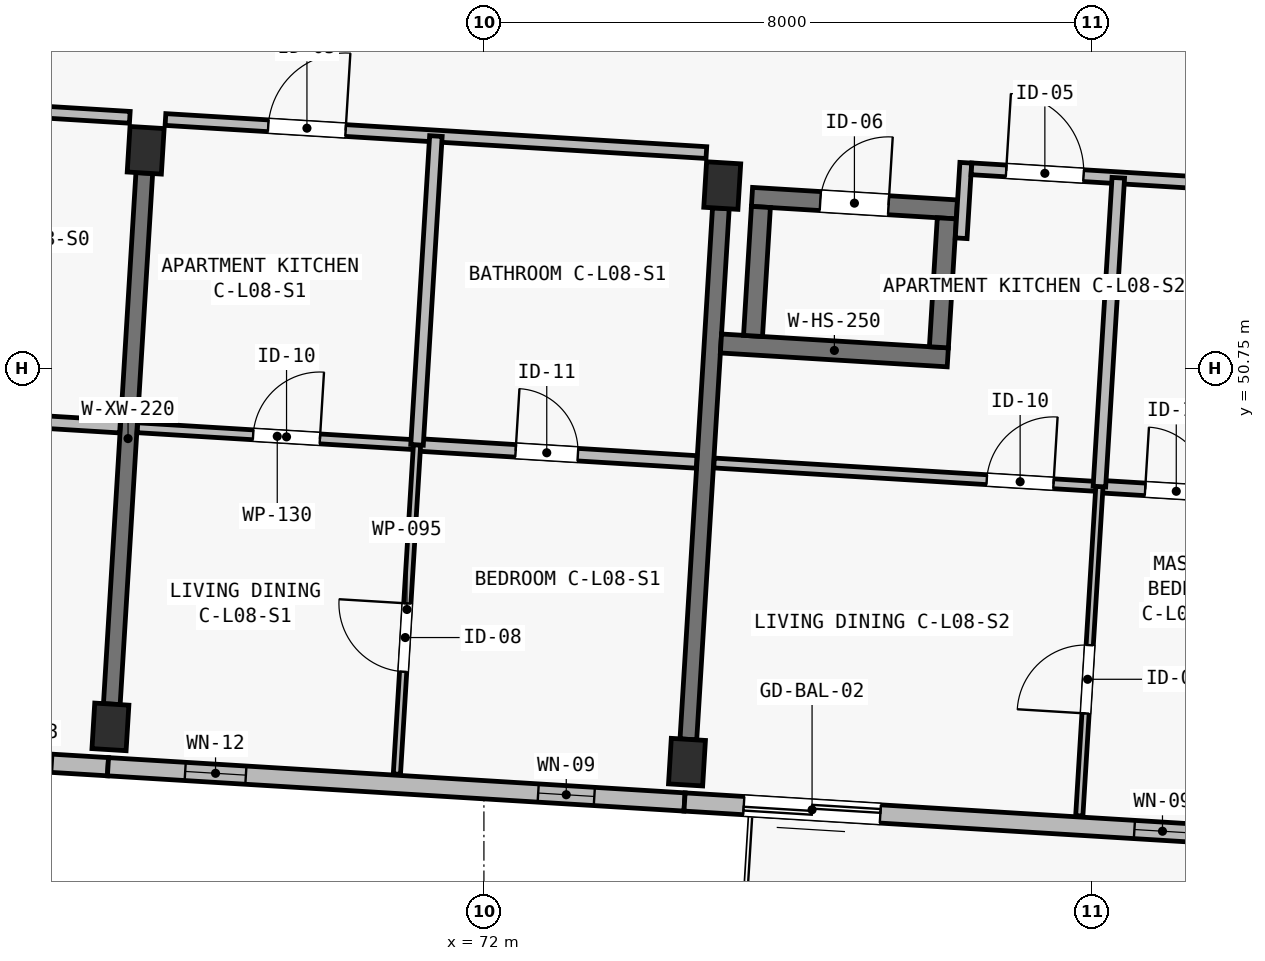
"""IFC4 building model, lengths in metres.
Left out: names, types, materials, properties, quantities, classifications, styles, units other than length and angle.
Written with IfcOpenShell. Run it as: python <this file> out.ifc"""

import sys

from ifc_helpers import new_model, si_unit, direction, frame, frame_2d, origin, origin_2d, place, context, subcontext, project, spatial, rectangle, extrude, element, fill, save


model = new_model("IFC4")
c1 = context("Model", 3, precision=1e-05, world=origin(), true_north=direction((0.0, 1.0)))
c2 = subcontext(c1, "Body", "Model", "MODEL_VIEW")
j1 = project(units=[si_unit("LENGTHUNIT", "METRE"), si_unit("PLANEANGLEUNIT", "RADIAN")], contexts=[c1])
p1 = place(None, origin())
s1 = spatial("IfcSite", under=j1, at=p1, CompositionType="ELEMENT")
p2 = place(p1, origin())
s2 = spatial("IfcBuilding", under=s1, at=p2, CompositionType="ELEMENT")
p3 = place(p2, frame((0.0, 0.0, 27.9)))
s3 = spatial("IfcBuildingStorey", under=s2, at=p3, CompositionType="ELEMENT", Elevation=27.9)
for number, where, z_axis, x_axis in (
    (1, (67.086, 46.036, 0.0), (0.0, 0.0, 1.0), (0.998, -0.061, 0.0)),
    (2, (67.55, 53.622, 0.0), (0.0, 0.0, 1.0), (0.998, -0.061, 0.0)),
    (3, (74.672, 45.572, 0.0), (0.0, 0.0, 1.0), (0.998, -0.061, 0.0)),
    (4, (75.135, 53.158, 0.0), (0.0, 0.0, 1.0), (0.998, -0.061, 0.0)),
):
    element("IfcColumn", number, at=place(p3, frame(where, z_axis=z_axis, x_axis=x_axis)), inside=s3, PredefinedType="COLUMN", context=c2, shape_type="SweptSolid", body=[
        extrude(rectangle(XDim=0.45, YDim=0.6, at=origin_2d()), origin(), (0.0, 0.0, 1.0), 3.25),
    ])
p4 = place(p3, frame((67.104, 46.335, 0.0), z_axis=(0.0, 0.0, 1.0), x_axis=(0.061034188237, 0.998135676081, 0.0)))
e5 = element("IfcWall", 5, at=p4, inside=s3, PredefinedType="SHEAR", context=c2, shape_type="SweptSolid", body=[
    extrude(rectangle(XDim=7.0, YDim=0.22, at=frame_2d((3.5, 0.0))), origin(), (0.0, 0.0, 1.0), 2.5),
])
p5 = place(p3, frame((74.69, 45.872, 0.0), z_axis=(0.0, 0.0, 1.0), x_axis=(0.061036313012, 0.998135546153, 0.0)))
e6 = element("IfcWall", 6, at=p5, inside=s3, PredefinedType="SHEAR", context=c2, shape_type="SweptSolid", body=[
    extrude(rectangle(XDim=7.0, YDim=0.22, at=frame_2d((3.5, 0.0))), origin(), (0.0, 0.0, 1.0), 2.5),
])
p6 = place(p3, frame((75.119, 51.08, 0.0), z_axis=(0.0, 0.0, 1.0), x_axis=(0.998133370443, -0.061071882298, 0.0)))
e7 = element("IfcWall", 7, at=p6, inside=s3, PredefinedType="SHEAR", context=c2, shape_type="SweptSolid", body=[
    extrude(rectangle(XDim=2.99, YDim=0.25, at=frame_2d((1.495, 0.0))), origin(), (0.0, 0.0, 1.0), 3.25),
])
p7 = place(p3, frame((75.527, 53.009, 0.0), z_axis=(0.0, 0.0, 1.0), x_axis=(0.998129907752, -0.061128448781, 0.0)))
e8 = element("IfcWall", 8, at=p7, inside=s3, PredefinedType="SHEAR", context=c2, shape_type="SweptSolid", body=[
    extrude(rectangle(XDim=2.7, YDim=0.25, at=frame_2d((1.35, 0.0))), origin(), (0.0, 0.0, 1.0), 3.25),
])
p8 = place(p7, frame((0.9, 0.0, 0.0)))
e9 = element("IfcOpeningElement", 9, at=p8, cuts=e8, PredefinedType="OPENING", context=c2, shape_type="SweptSolid", body=[
    extrude(rectangle(XDim=0.9, YDim=2.05, at=frame_2d((0.45, 1.025))), frame((0.0, 0.14, 0.0), z_axis=(0.0, -1.0, 0.0), x_axis=(1.0, 0.0, 0.0)), (0.0, 0.0, 1.0), 0.28),
])
p9 = place(p3, frame((75.541, 51.179, 0.0), z_axis=(0.0, 0.0, 1.0), x_axis=(0.061037062968, 0.998135500293, 0.0)))
e10 = element("IfcWall", 10, at=p9, inside=s3, PredefinedType="SHEAR", context=c2, shape_type="SweptSolid", body=[
    extrude(rectangle(XDim=1.7, YDim=0.25, at=frame_2d((0.85, 0.0))), origin(), (0.0, 0.0, 1.0), 3.25),
])
p10 = place(p3, frame((77.986, 51.03, 0.0), z_axis=(0.0, 0.0, 1.0), x_axis=(0.061028314627, 0.998136035225, 0.0)))
e11 = element("IfcWall", 11, at=p10, inside=s3, PredefinedType="SHEAR", context=c2, shape_type="SweptSolid", body=[
    extrude(rectangle(XDim=1.7, YDim=0.25, at=frame_2d((0.85, 0.0))), origin(), (0.0, 0.0, 1.0), 3.25),
])
p11 = place(p3, frame((67.054, 45.512, 0.0), z_axis=(0.0, 0.0, 1.0), x_axis=(-0.998134248939, 0.061057522844, 0.0)))
e12 = element("IfcWall", 12, at=p11, inside=s3, PredefinedType="SOLIDWALL", context=c2, shape_type="SweptSolid", body=[
    extrude(rectangle(XDim=8.125, YDim=0.24, at=frame_2d((4.062, 0.0))), origin(), (0.0, 0.0, 1.0), 3.0),
])
p12 = place(p11, frame((5.169, 0.0, 0.0)))
e13 = element("IfcOpeningElement", 13, at=p12, cuts=e12, PredefinedType="OPENING", context=c2, shape_type="SweptSolid", body=[
    extrude(rectangle(XDim=1.5, YDim=2.12, at=frame_2d((0.75, 1.06))), frame((0.0, 0.135, 0.0), z_axis=(0.0, -1.0, 0.0), x_axis=(1.0, 0.0, 0.0)), (0.0, 0.0, 1.0), 0.27),
])
p13 = place(p11, frame((0.73, 0.0, 0.5)))
e14 = element("IfcOpeningElement", 14, at=p13, cuts=e12, PredefinedType="OPENING", context=c2, shape_type="SweptSolid", body=[
    extrude(rectangle(XDim=0.62, YDim=2.28, at=frame_2d((0.31, 1.14))), frame((0.0, 0.135, 0.0), z_axis=(0.0, -1.0, 0.0), x_axis=(1.0, 0.0, 0.0)), (0.0, 0.0, 1.0), 0.27),
])
p14 = place(p3, frame((74.64, 45.048, 0.0), z_axis=(0.0, 0.0, 1.0), x_axis=(-0.998135669243, 0.061034300063, 0.0)))
e15 = element("IfcWall", 15, at=p14, inside=s3, PredefinedType="SOLIDWALL", context=c2, shape_type="SweptSolid", body=[
    extrude(rectangle(XDim=7.6, YDim=0.24, at=frame_2d((3.8, 0.0))), origin(), (0.0, 0.0, 1.0), 3.0),
])
p15 = place(p14, frame((1.189, 0.0, 0.42)))
e16 = element("IfcOpeningElement", 16, at=p15, cuts=e15, PredefinedType="OPENING", context=c2, shape_type="SweptSolid", body=[
    extrude(rectangle(XDim=0.74, YDim=2.26, at=frame_2d((0.37, 1.13))), frame((0.0, 0.135, 0.0), z_axis=(0.0, -1.0, 0.0), x_axis=(1.0, 0.0, 0.0)), (0.0, 0.0, 1.0), 0.27),
])
p16 = place(p14, frame((5.782, 0.0, 0.42)))
e17 = element("IfcOpeningElement", 17, at=p16, cuts=e15, PredefinedType="OPENING", context=c2, shape_type="SweptSolid", body=[
    extrude(rectangle(XDim=0.8, YDim=2.3, at=frame_2d((0.4, 1.15))), frame((0.0, 0.135, 0.0), z_axis=(0.0, -1.0, 0.0), x_axis=(1.0, 0.0, 0.0)), (0.0, 0.0, 1.0), 0.27),
])
p17 = place(p3, frame((82.225, 44.584, 0.0), z_axis=(0.0, 0.0, 1.0), x_axis=(-0.998133591969, 0.061068261669, 0.0)))
e18 = element("IfcWall", 18, at=p17, inside=s3, PredefinedType="SOLIDWALL", context=c2, shape_type="SweptSolid", body=[
    extrude(rectangle(XDim=7.6, YDim=0.24, at=frame_2d((3.8, 0.0))), origin(), (0.0, 0.0, 1.0), 3.0),
])
p18 = place(p17, frame((5.019, 0.0, 0.0)))
e19 = element("IfcOpeningElement", 19, at=p18, cuts=e18, PredefinedType="OPENING", context=c2, shape_type="SweptSolid", body=[
    extrude(rectangle(XDim=1.8, YDim=2.12, at=frame_2d((0.9, 1.06))), frame((0.0, 0.135, 0.0), z_axis=(0.0, -1.0, 0.0), x_axis=(1.0, 0.0, 0.0)), (0.0, 0.0, 1.0), 0.27),
])
p19 = place(p17, frame((0.93, 0.0, 0.46)))
e20 = element("IfcOpeningElement", 20, at=p19, cuts=e18, PredefinedType="OPENING", context=c2, shape_type="SweptSolid", body=[
    extrude(rectangle(XDim=0.74, YDim=2.26, at=frame_2d((0.37, 1.13))), frame((0.0, 0.135, 0.0), z_axis=(0.0, -1.0, 0.0), x_axis=(1.0, 0.0, 0.0)), (0.0, 0.0, 1.0), 0.27),
])
p20 = place(p3, frame((60.06, 54.501, 0.0), z_axis=(0.0, 0.0, 1.0), x_axis=(0.998135030865, -0.061044739012, 0.0)))
e21 = element("IfcWall", 21, at=p20, inside=s3, PredefinedType="PARTITIONING", context=c2, shape_type="SweptSolid", body=[
    extrude(rectangle(XDim=7.295, YDim=0.155, at=frame_2d((3.647, 0.0))), origin(), (0.0, 0.0, 1.0), 2.97),
])
p21 = place(p20, frame((1.52, 0.0, 0.0)))
e22 = element("IfcOpeningElement", 22, at=p21, cuts=e21, PredefinedType="OPENING", context=c2, shape_type="SweptSolid", body=[
    extrude(rectangle(XDim=0.98, YDim=2.15, at=frame_2d((0.49, 1.075))), frame((0.0, 0.093, 0.0), z_axis=(0.0, -1.0, 0.0), x_axis=(1.0, 0.0, 0.0)), (0.0, 0.0, 1.0), 0.185),
])
p22 = place(p3, frame((63.534, 50.211, 0.0), z_axis=(0.0, 0.0, 1.0), x_axis=(0.998132682596, -0.061083123148, 0.0)))
e23 = element("IfcWall", 23, at=p22, inside=s3, PredefinedType="PLUMBINGWALL", context=c2, shape_type="SweptSolid", body=[
    extrude(rectangle(XDim=3.685, YDim=0.165, at=frame_2d((1.843, 0.0))), origin(), (0.0, 0.0, 1.0), 2.97),
])
p23 = place(p22, frame((1.3, 0.0, 0.0)))
e24 = element("IfcOpeningElement", 24, at=p23, cuts=e23, PredefinedType="OPENING", context=c2, shape_type="SweptSolid", body=[
    extrude(rectangle(XDim=0.82, YDim=2.08, at=frame_2d((0.41, 1.04))), frame((0.0, 0.097, 0.0), z_axis=(0.0, -1.0, 0.0), x_axis=(1.0, 0.0, 0.0)), (0.0, 0.0, 1.0), 0.195),
])
p24 = place(p3, frame((67.81, 54.027, 0.0), z_axis=(0.0, 0.0, 1.0), x_axis=(0.998136655722, -0.061018165369, 0.0)))
e25 = element("IfcWall", 25, at=p24, inside=s3, PredefinedType="PARTITIONING", context=c2, shape_type="SweptSolid", body=[
    extrude(rectangle(XDim=7.13, YDim=0.155, at=frame_2d((3.565, 0.0))), origin(), (0.0, 0.0, 1.0), 2.97),
])
p25 = place(p24, frame((1.355, 0.0, 0.0)))
e26 = element("IfcOpeningElement", 26, at=p25, cuts=e25, PredefinedType="OPENING", context=c2, shape_type="SweptSolid", body=[
    extrude(rectangle(XDim=1.02, YDim=2.2, at=frame_2d((0.51, 1.1))), frame((0.0, 0.093, 0.0), z_axis=(0.0, -1.0, 0.0), x_axis=(1.0, 0.0, 0.0)), (0.0, 0.0, 1.0), 0.185),
])
p26 = place(p3, frame((67.442, 49.972, 0.0), z_axis=(0.0, 0.0, 1.0), x_axis=(0.998132682596, -0.061083123148, 0.0)))
e27 = element("IfcWall", 27, at=p26, inside=s3, PredefinedType="PARTITIONING", context=c2, shape_type="SweptSolid", body=[
    extrude(rectangle(XDim=3.685, YDim=0.13, at=frame_2d((1.843, 0.0))), origin(), (0.0, 0.0, 1.0), 2.97),
])
p27 = place(p26, frame((1.525, 0.0, 0.0)))
e28 = element("IfcOpeningElement", 28, at=p27, cuts=e27, PredefinedType="OPENING", context=c2, shape_type="SweptSolid", body=[
    extrude(rectangle(XDim=0.88, YDim=2.1, at=frame_2d((0.44, 1.05))), frame((0.0, 0.08, 0.0), z_axis=(0.0, -1.0, 0.0), x_axis=(1.0, 0.0, 0.0)), (0.0, 0.0, 1.0), 0.16),
])
p28 = place(p3, frame((71.12, 49.747, 0.0), z_axis=(0.0, 0.0, 1.0), x_axis=(0.998136719672, -0.061017119263, 0.0)))
e29 = element("IfcWall", 29, at=p28, inside=s3, PredefinedType="PLUMBINGWALL", context=c2, shape_type="SweptSolid", body=[
    extrude(rectangle(XDim=3.685, YDim=0.165, at=frame_2d((1.843, 0.0))), origin(), (0.0, 0.0, 1.0), 2.97),
])
p29 = place(p28, frame((1.3, 0.0, 0.0)))
e30 = element("IfcOpeningElement", 30, at=p29, cuts=e29, PredefinedType="OPENING", context=c2, shape_type="SweptSolid", body=[
    extrude(rectangle(XDim=0.82, YDim=2.08, at=frame_2d((0.41, 1.04))), frame((0.0, 0.097, 0.0), z_axis=(0.0, -1.0, 0.0), x_axis=(1.0, 0.0, 0.0)), (0.0, 0.0, 1.0), 0.195),
])
p30 = place(p3, frame((70.855, 45.415, 0.0), z_axis=(0.0, 0.0, 1.0), x_axis=(0.061036861365, 0.998135512621, 0.0)))
e31 = element("IfcWall", 31, at=p30, inside=s3, PredefinedType="PARTITIONING", context=c2, shape_type="SweptSolid", body=[
    extrude(rectangle(XDim=4.34, YDim=0.095, at=frame_2d((2.17, 0.0))), origin(), (0.0, 0.0, 1.0), 2.97),
])
p31 = place(p30, frame((1.35, 0.0, 0.0)))
e32 = element("IfcOpeningElement", 32, at=p31, cuts=e31, PredefinedType="OPENING", context=c2, shape_type="SweptSolid", body=[
    extrude(rectangle(XDim=0.9, YDim=2.1, at=frame_2d((0.45, 1.05))), frame((0.0, 0.062, 0.0), z_axis=(0.0, -1.0, 0.0), x_axis=(1.0, 0.0, 0.0)), (0.0, 0.0, 1.0), 0.125),
])
p32 = place(p3, frame((71.12, 49.747, 0.0), z_axis=(0.0, 0.0, 1.0), x_axis=(0.061063718724, 0.998133869907, 0.0)))
e33 = element("IfcWall", 33, at=p32, inside=s3, PredefinedType="PLUMBINGWALL", context=c2, shape_type="SweptSolid", body=[
    extrude(rectangle(XDim=4.07, YDim=0.165, at=frame_2d((2.035, 0.0))), origin(), (0.0, 0.0, 1.0), 2.97),
])
p33 = place(p3, frame((78.279, 52.465, 0.0), z_axis=(0.0, 0.0, 1.0), x_axis=(0.061095097219, 0.998131949742, 0.0)))
e34 = element("IfcWall", 34, at=p33, inside=s3, PredefinedType="PARTITIONING", context=c2, shape_type="SweptSolid", body=[
    extrude(rectangle(XDim=0.995, YDim=0.155, at=frame_2d((0.498, 0.0))), origin(), (0.0, 0.0, 1.0), 2.97),
])
p34 = place(p3, frame((78.415, 53.378, 0.0), z_axis=(0.0, 0.0, 1.0), x_axis=(0.998132736029, -0.061082250024, 0.0)))
e35 = element("IfcWall", 35, at=p34, inside=s3, PredefinedType="PARTITIONING", context=c2, shape_type="SweptSolid", body=[
    extrude(rectangle(XDim=4.105, YDim=0.155, at=frame_2d((2.052, 0.0))), origin(), (0.0, 0.0, 1.0), 2.97),
])
p35 = place(p34, frame((0.457, 0.0, 0.0)))
e36 = element("IfcOpeningElement", 36, at=p35, cuts=e35, PredefinedType="OPENING", context=c2, shape_type="SweptSolid", body=[
    extrude(rectangle(XDim=1.02, YDim=2.2, at=frame_2d((0.51, 1.1))), frame((0.0, 0.093, 0.0), z_axis=(0.0, -1.0, 0.0), x_axis=(1.0, 0.0, 0.0)), (0.0, 0.0, 1.0), 0.185),
])
p36 = place(p3, frame((75.028, 49.508, 0.0), z_axis=(0.0, 0.0, 1.0), x_axis=(0.998135637207, -0.061034823981, 0.0)))
e37 = element("IfcWall", 37, at=p36, inside=s3, PredefinedType="PARTITIONING", context=c2, shape_type="SweptSolid", body=[
    extrude(rectangle(XDim=5.08, YDim=0.13, at=frame_2d((2.54, 0.0))), origin(), (0.0, 0.0, 1.0), 2.97),
])
p37 = place(p36, frame((3.595, 0.0, 0.0)))
e38 = element("IfcOpeningElement", 38, at=p37, cuts=e37, PredefinedType="OPENING", context=c2, shape_type="SweptSolid", body=[
    extrude(rectangle(XDim=0.88, YDim=2.1, at=frame_2d((0.44, 1.05))), frame((0.0, 0.08, 0.0), z_axis=(0.0, -1.0, 0.0), x_axis=(1.0, 0.0, 0.0)), (0.0, 0.0, 1.0), 0.16),
])
p38 = place(p3, frame((80.098, 49.198, 0.0), z_axis=(0.0, 0.0, 1.0), x_axis=(0.998138723231, -0.060984335579, 0.0)))
e39 = element("IfcWall", 39, at=p38, inside=s3, PredefinedType="PLUMBINGWALL", context=c2, shape_type="SweptSolid", body=[
    extrude(rectangle(XDim=2.29, YDim=0.165, at=frame_2d((1.145, 0.0))), origin(), (0.0, 0.0, 1.0), 2.97),
])
p39 = place(p38, frame((0.603, 0.0, 0.0)))
e40 = element("IfcOpeningElement", 40, at=p39, cuts=e39, PredefinedType="OPENING", context=c2, shape_type="SweptSolid", body=[
    extrude(rectangle(XDim=0.82, YDim=2.08, at=frame_2d((0.41, 1.04))), frame((0.0, 0.097, 0.0), z_axis=(0.0, -1.0, 0.0), x_axis=(1.0, 0.0, 0.0)), (0.0, 0.0, 1.0), 0.195),
])
p40 = place(p3, frame((79.833, 44.866, 0.0), z_axis=(0.0, 0.0, 1.0), x_axis=(0.061036861365, 0.998135512621, 0.0)))
e41 = element("IfcWall", 41, at=p40, inside=s3, PredefinedType="PARTITIONING", context=c2, shape_type="SweptSolid", body=[
    extrude(rectangle(XDim=4.34, YDim=0.095, at=frame_2d((2.17, 0.0))), origin(), (0.0, 0.0, 1.0), 2.97),
])
p41 = place(p40, frame((1.35, 0.0, 0.0)))
e42 = element("IfcOpeningElement", 42, at=p41, cuts=e41, PredefinedType="OPENING", context=c2, shape_type="SweptSolid", body=[
    extrude(rectangle(XDim=0.9, YDim=2.1, at=frame_2d((0.45, 1.05))), frame((0.0, 0.062, 0.0), z_axis=(0.0, -1.0, 0.0), x_axis=(1.0, 0.0, 0.0)), (0.0, 0.0, 1.0), 0.125),
])
p42 = place(p3, frame((80.098, 49.198, 0.0), z_axis=(0.0, 0.0, 1.0), x_axis=(0.061063718724, 0.998133869907, 0.0)))
e43 = element("IfcWall", 43, at=p42, inside=s3, PredefinedType="PLUMBINGWALL", context=c2, shape_type="SweptSolid", body=[
    extrude(rectangle(XDim=4.07, YDim=0.165, at=frame_2d((2.035, 0.0))), origin(), (0.0, 0.0, 1.0), 2.97),
])
p43 = place(p13, origin())
e44 = element("IfcWindow", 44, at=p43, inside=s3, PartitioningType="SINGLE_PANEL", PredefinedType="WINDOW", context=c2, shape_type="SweptSolid", body=[
    extrude(rectangle(XDim=0.62, YDim=2.28, at=frame_2d((0.31, 1.14))), frame((0.0, 0.03, 0.0), z_axis=(0.0, -1.0, 0.0), x_axis=(1.0, 0.0, 0.0)), (0.0, 0.0, 1.0), 0.06),
])
fill(e14, e44)
p44 = place(p15, origin())
e45 = element("IfcWindow", 45, at=p44, inside=s3, PartitioningType="SINGLE_PANEL", PredefinedType="WINDOW", context=c2, shape_type="SweptSolid", body=[
    extrude(rectangle(XDim=0.74, YDim=2.26, at=frame_2d((0.37, 1.13))), frame((0.0, 0.03, 0.0), z_axis=(0.0, -1.0, 0.0), x_axis=(1.0, 0.0, 0.0)), (0.0, 0.0, 1.0), 0.06),
])
fill(e16, e45)
p45 = place(p16, origin())
e46 = element("IfcWindow", 46, at=p45, inside=s3, PartitioningType="SINGLE_PANEL", PredefinedType="WINDOW", context=c2, shape_type="SweptSolid", body=[
    extrude(rectangle(XDim=0.8, YDim=2.3, at=frame_2d((0.4, 1.15))), frame((0.0, 0.03, 0.0), z_axis=(0.0, -1.0, 0.0), x_axis=(1.0, 0.0, 0.0)), (0.0, 0.0, 1.0), 0.06),
])
fill(e17, e46)
p46 = place(p18, origin())
e47 = element("IfcDoor", 47, at=p46, inside=s3, OperationType="SLIDING_TO_LEFT", PredefinedType="DOOR", context=c2, shape_type="SweptSolid", body=[
    extrude(rectangle(XDim=1.8, YDim=2.12, at=frame_2d((0.9, 1.06))), frame((0.0, 0.025, 0.0), z_axis=(0.0, -1.0, 0.0), x_axis=(1.0, 0.0, 0.0)), (0.0, 0.0, 1.0), 0.05),
])
fill(e19, e47)
p47 = place(p19, origin())
e48 = element("IfcWindow", 48, at=p47, inside=s3, PartitioningType="SINGLE_PANEL", PredefinedType="WINDOW", context=c2, shape_type="SweptSolid", body=[
    extrude(rectangle(XDim=0.74, YDim=2.26, at=frame_2d((0.37, 1.13))), frame((0.0, 0.03, 0.0), z_axis=(0.0, -1.0, 0.0), x_axis=(1.0, 0.0, 0.0)), (0.0, 0.0, 1.0), 0.06),
])
fill(e20, e48)
p48 = place(p25, origin())
e49 = element("IfcDoor", 49, at=p48, inside=s3, OperationType="SINGLE_SWING_RIGHT", PredefinedType="DOOR", context=c2, shape_type="SweptSolid", body=[
    extrude(rectangle(XDim=1.02, YDim=2.2, at=frame_2d((0.51, 1.1))), frame((0.0, 0.025, 0.0), z_axis=(0.0, -1.0, 0.0), x_axis=(1.0, 0.0, 0.0)), (0.0, 0.0, 1.0), 0.05),
])
fill(e26, e49)
p49 = place(p27, origin())
e50 = element("IfcDoor", 50, at=p49, inside=s3, OperationType="SINGLE_SWING_RIGHT", PredefinedType="DOOR", context=c2, shape_type="SweptSolid", body=[
    extrude(rectangle(XDim=0.88, YDim=2.1, at=frame_2d((0.44, 1.05))), frame((0.0, 0.025, 0.0), z_axis=(0.0, -1.0, 0.0), x_axis=(1.0, 0.0, 0.0)), (0.0, 0.0, 1.0), 0.05),
])
fill(e28, e50)
p50 = place(p29, origin())
e51 = element("IfcDoor", 51, at=p50, inside=s3, OperationType="SINGLE_SWING_LEFT", PredefinedType="DOOR", context=c2, shape_type="SweptSolid", body=[
    extrude(rectangle(XDim=0.82, YDim=2.08, at=frame_2d((0.41, 1.04))), frame((0.0, 0.025, 0.0), z_axis=(0.0, -1.0, 0.0), x_axis=(1.0, 0.0, 0.0)), (0.0, 0.0, 1.0), 0.05),
])
fill(e30, e51)
p51 = place(p31, origin())
e52 = element("IfcDoor", 52, at=p51, inside=s3, OperationType="SINGLE_SWING_RIGHT", PredefinedType="DOOR", context=c2, shape_type="SweptSolid", body=[
    extrude(rectangle(XDim=0.9, YDim=2.1, at=frame_2d((0.45, 1.05))), frame((0.0, 0.025, 0.0), z_axis=(0.0, -1.0, 0.0), x_axis=(1.0, 0.0, 0.0)), (0.0, 0.0, 1.0), 0.05),
])
fill(e32, e52)
p52 = place(p35, origin())
e53 = element("IfcDoor", 53, at=p52, inside=s3, OperationType="SINGLE_SWING_LEFT", PredefinedType="DOOR", context=c2, shape_type="SweptSolid", body=[
    extrude(rectangle(XDim=1.02, YDim=2.2, at=frame_2d((0.51, 1.1))), frame((0.0, 0.025, 0.0), z_axis=(0.0, -1.0, 0.0), x_axis=(1.0, 0.0, 0.0)), (0.0, 0.0, 1.0), 0.05),
])
fill(e36, e53)
p53 = place(p37, origin())
e54 = element("IfcDoor", 54, at=p53, inside=s3, OperationType="SINGLE_SWING_RIGHT", PredefinedType="DOOR", context=c2, shape_type="SweptSolid", body=[
    extrude(rectangle(XDim=0.88, YDim=2.1, at=frame_2d((0.44, 1.05))), frame((0.0, 0.025, 0.0), z_axis=(0.0, -1.0, 0.0), x_axis=(1.0, 0.0, 0.0)), (0.0, 0.0, 1.0), 0.05),
])
fill(e38, e54)
p54 = place(p39, origin())
e55 = element("IfcDoor", 55, at=p54, inside=s3, OperationType="SINGLE_SWING_LEFT", PredefinedType="DOOR", context=c2, shape_type="SweptSolid", body=[
    extrude(rectangle(XDim=0.82, YDim=2.08, at=frame_2d((0.41, 1.04))), frame((0.0, 0.025, 0.0), z_axis=(0.0, -1.0, 0.0), x_axis=(1.0, 0.0, 0.0)), (0.0, 0.0, 1.0), 0.05),
])
fill(e40, e55)
p55 = place(p41, origin())
e56 = element("IfcDoor", 56, at=p55, inside=s3, OperationType="SINGLE_SWING_LEFT", PredefinedType="DOOR", context=c2, shape_type="SweptSolid", body=[
    extrude(rectangle(XDim=0.9, YDim=2.1, at=frame_2d((0.45, 1.05))), frame((0.0, 0.025, 0.0), z_axis=(0.0, -1.0, 0.0), x_axis=(1.0, 0.0, 0.0)), (0.0, 0.0, 1.0), 0.05),
])
fill(e42, e56)
p56 = place(p8, origin())
e57 = element("IfcDoor", 57, at=p56, inside=s3, OperationType="SINGLE_SWING_RIGHT", PredefinedType="DOOR", context=c2, shape_type="SweptSolid", body=[
    extrude(rectangle(XDim=0.9, YDim=2.05, at=frame_2d((0.45, 1.025))), frame((0.0, 0.025, 0.0), z_axis=(0.0, -1.0, 0.0), x_axis=(1.0, 0.0, 0.0)), (0.0, 0.0, 1.0), 0.05),
])
fill(e9, e57)
save(model, sys.argv[1])
